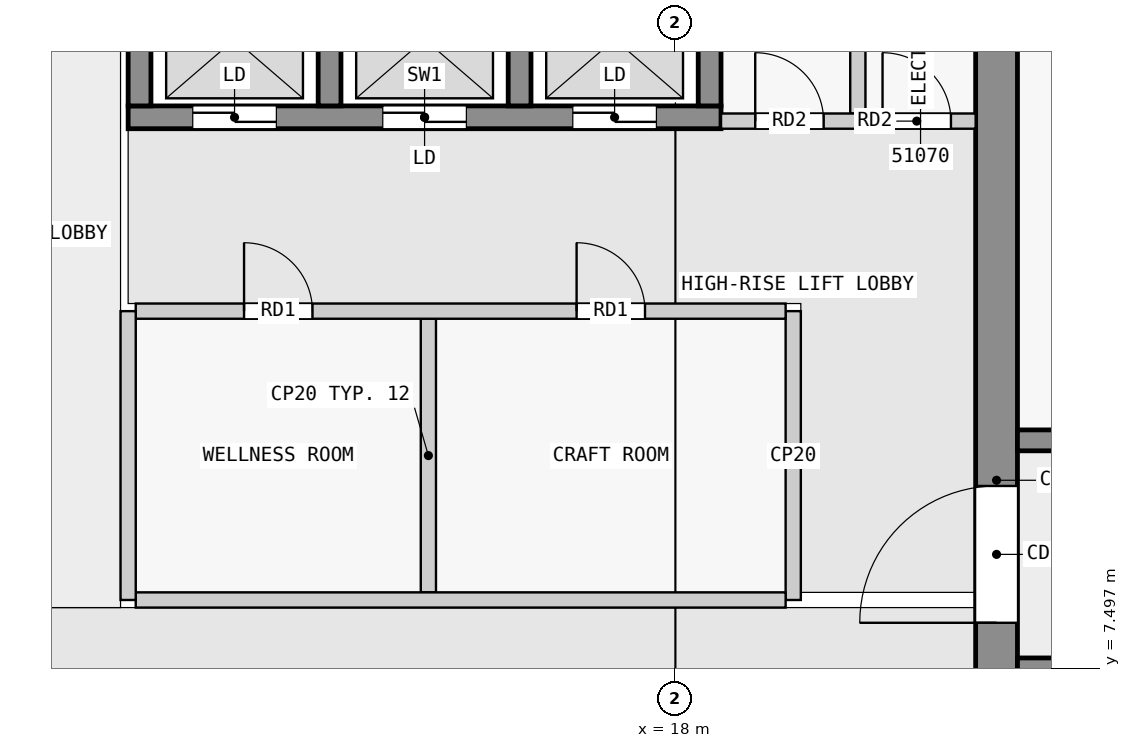
"""IFC4 building model, lengths in metres.
Left out: names, types, materials, properties, quantities, classifications, styles, units other than length and angle.
Written with IfcOpenShell. Run it as: python <this file> out.ifc"""

import sys

from ifc_helpers import new_model, si_unit, direction, frame, frame_2d, origin, place, context, subcontext, project, spatial, rectangle, extrude, element, fill, save


model = new_model("IFC4")
c1 = context("Model", 3, precision=1e-05, world=origin(), true_north=direction((0.0, 1.0)))
c2 = subcontext(c1, "Body", "Model", "MODEL_VIEW")
j1 = project(units=[si_unit("LENGTHUNIT", "METRE"), si_unit("PLANEANGLEUNIT", "RADIAN")], contexts=[c1])
p1 = place(None, origin())
s1 = spatial("IfcSite", under=j1, at=p1, CompositionType="ELEMENT")
p2 = place(p1, origin())
s2 = spatial("IfcBuilding", under=s1, at=p2, CompositionType="ELEMENT")
p3 = place(p2, frame((0.0, 0.0, 197.9)))
s3 = spatial("IfcBuildingStorey", under=s2, at=p3, CompositionType="ELEMENT", Elevation=197.9)
p4 = place(p3, frame((22.225, 2.5, 0.0), z_axis=(0.0, 0.0, 1.0), x_axis=(0.0, 1.0, 0.0)))
e1 = element("IfcWall", 1, at=p4, inside=s3, PredefinedType="SHEAR", context=c2, shape_type="SweptSolid", body=[
    extrude(rectangle(XDim=14.95, YDim=0.55, at=frame_2d((7.475, 0.0))), origin(), (0.0, 0.0, 1.0), 3.25),
])
p5 = place(p4, frame((5.6, 0.0, 0.0)))
e2 = element("IfcOpeningElement", 2, at=p5, cuts=e1, PredefinedType="OPENING", context=c2, shape_type="SweptSolid", body=[
    extrude(rectangle(XDim=1.8, YDim=2.1, at=frame_2d((0.9, 1.05))), frame((0.0, 0.285, 0.0), z_axis=(0.0, -1.0, 0.0), x_axis=(1.0, 0.0, 0.0)), (0.0, 0.0, 1.0), 0.57),
])
p6 = place(p3, frame((10.8, 14.75, 0.0), z_axis=(0.0, 0.0, 1.0), x_axis=(1.0, 0.0, 0.0)))
e3 = element("IfcWall", 3, at=p6, inside=s3, PredefinedType="SHEAR", context=c2, shape_type="SweptSolid", body=[
    extrude(rectangle(XDim=7.8, YDim=0.3, at=frame_2d((3.9, 0.0))), origin(), (0.0, 0.0, 1.0), 3.25),
])
p7 = place(p6, frame((0.85, 0.0, 0.0)))
e4 = element("IfcOpeningElement", 4, at=p7, cuts=e3, PredefinedType="OPENING", context=c2, shape_type="SweptSolid", body=[
    extrude(rectangle(XDim=1.1, YDim=2.1, at=frame_2d((0.55, 1.05))), frame((0.0, 0.16, 0.0), z_axis=(0.0, -1.0, 0.0), x_axis=(1.0, 0.0, 0.0)), (0.0, 0.0, 1.0), 0.32),
])
p8 = place(p6, frame((3.35, 0.0, 0.0)))
e5 = element("IfcOpeningElement", 5, at=p8, cuts=e3, PredefinedType="OPENING", context=c2, shape_type="SweptSolid", body=[
    extrude(rectangle(XDim=1.1, YDim=2.1, at=frame_2d((0.55, 1.05))), frame((0.0, 0.16, 0.0), z_axis=(0.0, -1.0, 0.0), x_axis=(1.0, 0.0, 0.0)), (0.0, 0.0, 1.0), 0.32),
])
p9 = place(p6, frame((5.85, 0.0, 0.0)))
e6 = element("IfcOpeningElement", 6, at=p9, cuts=e3, PredefinedType="OPENING", context=c2, shape_type="SweptSolid", body=[
    extrude(rectangle(XDim=1.1, YDim=2.1, at=frame_2d((0.55, 1.05))), frame((0.0, 0.16, 0.0), z_axis=(0.0, -1.0, 0.0), x_axis=(1.0, 0.0, 0.0)), (0.0, 0.0, 1.0), 0.32),
])
for number, where, z_axis, x_axis in (
    (7, (10.95, 14.9, 0.0), (0.0, 0.0, 1.0), (0.0, 1.0, 0.0)),
    (8, (13.45, 14.9, 0.0), (0.0, 0.0, 1.0), (0.0, 1.0, 0.0)),
    (9, (15.95, 14.9, 0.0), (0.0, 0.0, 1.0), (0.0, 1.0, 0.0)),
    (10, (18.45, 14.9, 0.0), (0.0, 0.0, 1.0), (0.0, 1.0, 0.0)),
):
    element("IfcWall", number, at=place(p3, frame(where, z_axis=z_axis, x_axis=x_axis)), inside=s3, PredefinedType="SHEAR", context=c2, shape_type="SweptSolid", body=[
        extrude(rectangle(XDim=2.0, YDim=0.3, at=frame_2d((1.0, 0.0))), origin(), (0.0, 0.0, 1.0), 3.25),
    ])
p10 = place(p3, frame((22.5, 7.5, 0.0), z_axis=(0.0, 0.0, 1.0), x_axis=(1.0, 0.0, 0.0)))
e11 = element("IfcWall", 11, at=p10, inside=s3, PredefinedType="SHEAR", context=c2, shape_type="SweptSolid", body=[
    extrude(rectangle(XDim=22.5, YDim=0.275, at=frame_2d((11.25, 0.0))), origin(), (0.0, 0.0, 1.0), 3.25),
])
p11 = place(p10, frame((1.75, 0.0, 0.0)))
e12 = element("IfcOpeningElement", 12, at=p11, cuts=e11, PredefinedType="OPENING", context=c2, shape_type="SweptSolid", body=[
    extrude(rectangle(XDim=1.0, YDim=2.1, at=frame_2d((0.5, 1.05))), frame((0.0, 0.147, 0.0), z_axis=(0.0, -1.0, 0.0), x_axis=(1.0, 0.0, 0.0)), (0.0, 0.0, 1.0), 0.295),
])
p12 = place(p10, frame((5.85, 0.0, 0.0)))
e13 = element("IfcOpeningElement", 13, at=p12, cuts=e11, PredefinedType="OPENING", context=c2, shape_type="SweptSolid", body=[
    extrude(rectangle(XDim=1.8, YDim=2.1, at=frame_2d((0.9, 1.05))), frame((0.0, 0.147, 0.0), z_axis=(0.0, -1.0, 0.0), x_axis=(1.0, 0.0, 0.0)), (0.0, 0.0, 1.0), 0.295),
])
p13 = place(p10, frame((10.75, 0.0, 0.0)))
e14 = element("IfcOpeningElement", 14, at=p13, cuts=e11, PredefinedType="OPENING", context=c2, shape_type="SweptSolid", body=[
    extrude(rectangle(XDim=1.0, YDim=2.1, at=frame_2d((0.5, 1.05))), frame((0.0, 0.147, 0.0), z_axis=(0.0, -1.0, 0.0), x_axis=(1.0, 0.0, 0.0)), (0.0, 0.0, 1.0), 0.295),
])
p14 = place(p10, frame((16.85, 0.0, 0.0)))
e15 = element("IfcOpeningElement", 15, at=p14, cuts=e11, PredefinedType="OPENING", context=c2, shape_type="SweptSolid", body=[
    extrude(rectangle(XDim=1.0, YDim=2.1, at=frame_2d((0.5, 1.05))), frame((0.0, 0.147, 0.0), z_axis=(0.0, -1.0, 0.0), x_axis=(1.0, 0.0, 0.0)), (0.0, 0.0, 1.0), 0.295),
])
p15 = place(p3, frame((22.5, 10.5, 0.0), z_axis=(0.0, 0.0, 1.0), x_axis=(1.0, 0.0, 0.0)))
e16 = element("IfcWall", 16, at=p15, inside=s3, PredefinedType="SHEAR", context=c2, shape_type="SweptSolid", body=[
    extrude(rectangle(XDim=22.5, YDim=0.275, at=frame_2d((11.25, 0.0))), origin(), (0.0, 0.0, 1.0), 3.25),
])
p16 = place(p15, frame((1.75, 0.0, 0.0)))
e17 = element("IfcOpeningElement", 17, at=p16, cuts=e16, PredefinedType="OPENING", context=c2, shape_type="SweptSolid", body=[
    extrude(rectangle(XDim=1.0, YDim=2.1, at=frame_2d((0.5, 1.05))), frame((0.0, 0.147, 0.0), z_axis=(0.0, -1.0, 0.0), x_axis=(1.0, 0.0, 0.0)), (0.0, 0.0, 1.0), 0.295),
])
p17 = place(p15, frame((6.25, 0.0, 0.0)))
e18 = element("IfcOpeningElement", 18, at=p17, cuts=e16, PredefinedType="OPENING", context=c2, shape_type="SweptSolid", body=[
    extrude(rectangle(XDim=1.0, YDim=2.1, at=frame_2d((0.5, 1.05))), frame((0.0, 0.147, 0.0), z_axis=(0.0, -1.0, 0.0), x_axis=(1.0, 0.0, 0.0)), (0.0, 0.0, 1.0), 0.295),
])
p18 = place(p15, frame((10.75, 0.0, 0.0)))
e19 = element("IfcOpeningElement", 19, at=p18, cuts=e16, PredefinedType="OPENING", context=c2, shape_type="SweptSolid", body=[
    extrude(rectangle(XDim=1.0, YDim=2.1, at=frame_2d((0.5, 1.05))), frame((0.0, 0.147, 0.0), z_axis=(0.0, -1.0, 0.0), x_axis=(1.0, 0.0, 0.0)), (0.0, 0.0, 1.0), 0.295),
])
p19 = place(p15, frame((15.25, 0.0, 0.0)))
e20 = element("IfcOpeningElement", 20, at=p19, cuts=e16, PredefinedType="OPENING", context=c2, shape_type="SweptSolid", body=[
    extrude(rectangle(XDim=1.0, YDim=2.1, at=frame_2d((0.5, 1.05))), frame((0.0, 0.147, 0.0), z_axis=(0.0, -1.0, 0.0), x_axis=(1.0, 0.0, 0.0)), (0.0, 0.0, 1.0), 0.295),
])
p20 = place(p15, frame((18.75, 0.0, 0.0)))
e21 = element("IfcOpeningElement", 21, at=p20, cuts=e16, PredefinedType="OPENING", context=c2, shape_type="SweptSolid", body=[
    extrude(rectangle(XDim=0.9, YDim=2.1, at=frame_2d((0.45, 1.05))), frame((0.0, 0.147, 0.0), z_axis=(0.0, -1.0, 0.0), x_axis=(1.0, 0.0, 0.0)), (0.0, 0.0, 1.0), 0.295),
])
p21 = place(p15, frame((20.95, 0.0, 0.0)))
e22 = element("IfcOpeningElement", 22, at=p21, cuts=e16, PredefinedType="OPENING", context=c2, shape_type="SweptSolid", body=[
    extrude(rectangle(XDim=1.0, YDim=2.1, at=frame_2d((0.5, 1.05))), frame((0.0, 0.147, 0.0), z_axis=(0.0, -1.0, 0.0), x_axis=(1.0, 0.0, 0.0)), (0.0, 0.0, 1.0), 0.295),
])
p22 = place(p3, frame((10.8, 8.4, 0.0), z_axis=(0.0, 0.0, 1.0), x_axis=(0.0, 1.0, 0.0)))
e23 = element("IfcWall", 23, at=p22, inside=s3, PredefinedType="PARTITIONING", context=c2, shape_type="SweptSolid", body=[
    extrude(rectangle(XDim=3.8, YDim=0.2, at=frame_2d((1.9, 0.0))), origin(), (0.0, 0.0, 1.0), 3.25),
])
p23 = place(p3, frame((10.9, 8.4, 0.0), z_axis=(0.0, 0.0, 1.0), x_axis=(1.0, 0.0, 0.0)))
e24 = element("IfcWall", 24, at=p23, inside=s3, PredefinedType="PARTITIONING", context=c2, shape_type="SweptSolid", body=[
    extrude(rectangle(XDim=8.55, YDim=0.2, at=frame_2d((4.275, 0.0))), origin(), (0.0, 0.0, 1.0), 3.25),
])
p24 = place(p3, frame((19.55, 8.4, 0.0), z_axis=(0.0, 0.0, 1.0), x_axis=(0.0, 1.0, 0.0)))
e25 = element("IfcWall", 25, at=p24, inside=s3, PredefinedType="PARTITIONING", context=c2, shape_type="SweptSolid", body=[
    extrude(rectangle(XDim=3.8, YDim=0.2, at=frame_2d((1.9, 0.0))), origin(), (0.0, 0.0, 1.0), 3.25),
])
p25 = place(p3, frame((10.9, 12.2, 0.0), z_axis=(0.0, 0.0, 1.0), x_axis=(1.0, 0.0, 0.0)))
e26 = element("IfcWall", 26, at=p25, inside=s3, PredefinedType="PARTITIONING", context=c2, shape_type="SweptSolid", body=[
    extrude(rectangle(XDim=8.55, YDim=0.2, at=frame_2d((4.275, 0.0))), origin(), (0.0, 0.0, 1.0), 3.25),
])
p26 = place(p25, frame((1.425, 0.0, 0.0)))
e27 = element("IfcOpeningElement", 27, at=p26, cuts=e26, PredefinedType="OPENING", context=c2, shape_type="SweptSolid", body=[
    extrude(rectangle(XDim=0.9, YDim=2.1, at=frame_2d((0.45, 1.05))), frame((0.0, 0.11, 0.0), z_axis=(0.0, -1.0, 0.0), x_axis=(1.0, 0.0, 0.0)), (0.0, 0.0, 1.0), 0.22),
])
p27 = place(p25, frame((5.8, 0.0, 0.0)))
e28 = element("IfcOpeningElement", 28, at=p27, cuts=e26, PredefinedType="OPENING", context=c2, shape_type="SweptSolid", body=[
    extrude(rectangle(XDim=0.9, YDim=2.1, at=frame_2d((0.45, 1.05))), frame((0.0, 0.11, 0.0), z_axis=(0.0, -1.0, 0.0), x_axis=(1.0, 0.0, 0.0)), (0.0, 0.0, 1.0), 0.22),
])
p28 = place(p3, frame((14.75, 8.5, 0.0), z_axis=(0.0, 0.0, 1.0), x_axis=(0.0, 1.0, 0.0)))
e29 = element("IfcWall", 29, at=p28, inside=s3, PredefinedType="PARTITIONING", context=c2, shape_type="SweptSolid", body=[
    extrude(rectangle(XDim=3.6, YDim=0.2, at=frame_2d((1.8, 0.0))), origin(), (0.0, 0.0, 1.0), 3.25),
])
p29 = place(p3, frame((18.6, 14.7, 0.0), z_axis=(0.0, 0.0, 1.0), x_axis=(1.0, 0.0, 0.0)))
e30 = element("IfcWall", 30, at=p29, inside=s3, PredefinedType="PARTITIONING", context=c2, shape_type="SweptSolid", body=[
    extrude(rectangle(XDim=3.35, YDim=0.2, at=frame_2d((1.675, 0.0))), origin(), (0.0, 0.0, 1.0), 3.25),
])
p30 = place(p29, frame((0.45, 0.0, 0.0)))
e31 = element("IfcOpeningElement", 31, at=p30, cuts=e30, PredefinedType="OPENING", context=c2, shape_type="SweptSolid", body=[
    extrude(rectangle(XDim=0.9, YDim=2.1, at=frame_2d((0.45, 1.05))), frame((0.0, 0.11, 0.0), z_axis=(0.0, -1.0, 0.0), x_axis=(1.0, 0.0, 0.0)), (0.0, 0.0, 1.0), 0.22),
])
p31 = place(p29, frame((2.125, 0.0, 0.0)))
e32 = element("IfcOpeningElement", 32, at=p31, cuts=e30, PredefinedType="OPENING", context=c2, shape_type="SweptSolid", body=[
    extrude(rectangle(XDim=0.9, YDim=2.1, at=frame_2d((0.45, 1.05))), frame((0.0, 0.11, 0.0), z_axis=(0.0, -1.0, 0.0), x_axis=(1.0, 0.0, 0.0)), (0.0, 0.0, 1.0), 0.22),
])
p32 = place(p3, frame((20.4, 14.8, 0.0), z_axis=(0.0, 0.0, 1.0), x_axis=(0.0, 1.0, 0.0)))
e33 = element("IfcWall", 33, at=p32, inside=s3, PredefinedType="PARTITIONING", context=c2, shape_type="SweptSolid", body=[
    extrude(rectangle(XDim=2.65, YDim=0.2, at=frame_2d((1.325, 0.0))), origin(), (0.0, 0.0, 1.0), 3.25),
])
p33 = place(p26, origin())
e34 = element("IfcDoor", 34, at=p33, inside=s3, OperationType="SINGLE_SWING_LEFT", PredefinedType="DOOR", context=c2, shape_type="SweptSolid", body=[
    extrude(rectangle(XDim=0.9, YDim=2.1, at=frame_2d((0.45, 1.05))), frame((0.0, 0.025, 0.0), z_axis=(0.0, -1.0, 0.0), x_axis=(1.0, 0.0, 0.0)), (0.0, 0.0, 1.0), 0.05),
])
fill(e27, e34)
p34 = place(p27, origin())
e35 = element("IfcDoor", 35, at=p34, inside=s3, OperationType="SINGLE_SWING_LEFT", PredefinedType="DOOR", context=c2, shape_type="SweptSolid", body=[
    extrude(rectangle(XDim=0.9, YDim=2.1, at=frame_2d((0.45, 1.05))), frame((0.0, 0.025, 0.0), z_axis=(0.0, -1.0, 0.0), x_axis=(1.0, 0.0, 0.0)), (0.0, 0.0, 1.0), 0.05),
])
fill(e28, e35)
p35 = place(p7, origin())
e36 = element("IfcDoor", 36, at=p35, inside=s3, OperationType="DOUBLE_DOOR_SLIDING", PredefinedType="DOOR", context=c2, shape_type="SweptSolid", body=[
    extrude(rectangle(XDim=1.1, YDim=2.1, at=frame_2d((0.55, 1.05))), frame((0.0, 0.025, 0.0), z_axis=(0.0, -1.0, 0.0), x_axis=(1.0, 0.0, 0.0)), (0.0, 0.0, 1.0), 0.05),
])
fill(e4, e36)
p36 = place(p8, origin())
e37 = element("IfcDoor", 37, at=p36, inside=s3, OperationType="DOUBLE_DOOR_SLIDING", PredefinedType="DOOR", context=c2, shape_type="SweptSolid", body=[
    extrude(rectangle(XDim=1.1, YDim=2.1, at=frame_2d((0.55, 1.05))), frame((0.0, 0.025, 0.0), z_axis=(0.0, -1.0, 0.0), x_axis=(1.0, 0.0, 0.0)), (0.0, 0.0, 1.0), 0.05),
])
fill(e5, e37)
p37 = place(p9, origin())
e38 = element("IfcDoor", 38, at=p37, inside=s3, OperationType="DOUBLE_DOOR_SLIDING", PredefinedType="DOOR", context=c2, shape_type="SweptSolid", body=[
    extrude(rectangle(XDim=1.1, YDim=2.1, at=frame_2d((0.55, 1.05))), frame((0.0, 0.025, 0.0), z_axis=(0.0, -1.0, 0.0), x_axis=(1.0, 0.0, 0.0)), (0.0, 0.0, 1.0), 0.05),
])
fill(e6, e38)
p38 = place(p5, origin())
e39 = element("IfcDoor", 39, at=p38, inside=s3, OperationType="DOUBLE_DOOR_SINGLE_SWING", PredefinedType="DOOR", context=c2, shape_type="SweptSolid", body=[
    extrude(rectangle(XDim=1.8, YDim=2.1, at=frame_2d((0.9, 1.05))), frame((0.0, 0.025, 0.0), z_axis=(0.0, -1.0, 0.0), x_axis=(1.0, 0.0, 0.0)), (0.0, 0.0, 1.0), 0.05),
])
fill(e2, e39)
p39 = place(p30, origin())
e40 = element("IfcDoor", 40, at=p39, inside=s3, OperationType="SINGLE_SWING_LEFT", PredefinedType="DOOR", context=c2, shape_type="SweptSolid", body=[
    extrude(rectangle(XDim=0.9, YDim=2.1, at=frame_2d((0.45, 1.05))), frame((0.0, 0.025, 0.0), z_axis=(0.0, -1.0, 0.0), x_axis=(1.0, 0.0, 0.0)), (0.0, 0.0, 1.0), 0.05),
])
fill(e31, e40)
p40 = place(p31, origin())
e41 = element("IfcDoor", 41, at=p40, inside=s3, OperationType="SINGLE_SWING_LEFT", PredefinedType="DOOR", context=c2, shape_type="SweptSolid", body=[
    extrude(rectangle(XDim=0.9, YDim=2.1, at=frame_2d((0.45, 1.05))), frame((0.0, 0.025, 0.0), z_axis=(0.0, -1.0, 0.0), x_axis=(1.0, 0.0, 0.0)), (0.0, 0.0, 1.0), 0.05),
])
fill(e32, e41)
save(model, sys.argv[1])
